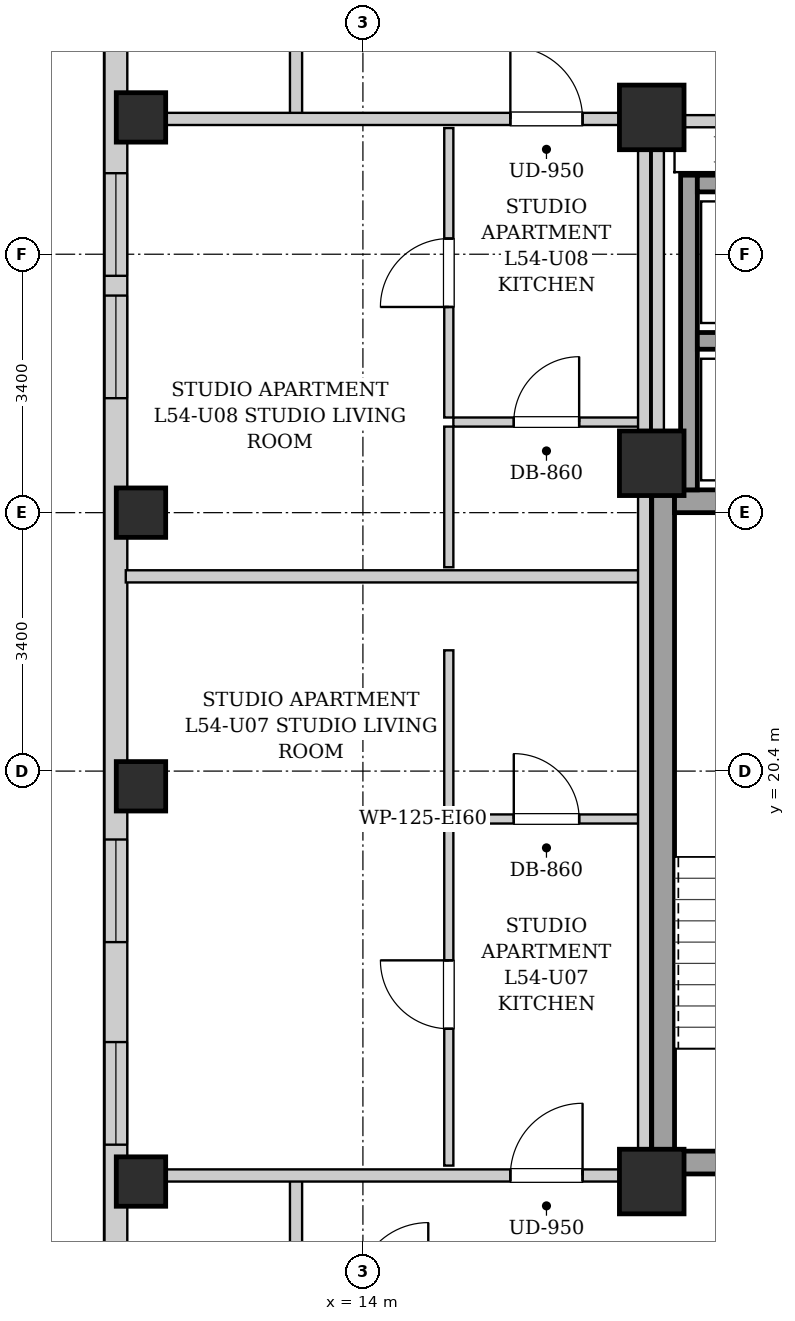
"""IFC4 building model, lengths in metres.
Left out: names, types, materials, properties, quantities, classifications, styles, units other than length and angle.
Written with IfcOpenShell. Run it as: python <this file> out.ifc"""

import sys

from ifc_helpers import new_model, si_unit, direction, frame, frame_2d, origin, origin_2d, place, context, subcontext, project, spatial, rectangle, extrude, element, fill, save


model = new_model("IFC4")
c1 = context("Model", 3, precision=1e-05, world=origin(), true_north=direction((0.0, 1.0)))
c2 = subcontext(c1, "Body", "Model", "MODEL_VIEW")
j1 = project(units=[si_unit("LENGTHUNIT", "METRE"), si_unit("PLANEANGLEUNIT", "RADIAN")], contexts=[c1])
p1 = place(None, origin())
s1 = spatial("IfcSite", under=j1, at=p1, CompositionType="ELEMENT")
p2 = place(p1, origin())
s2 = spatial("IfcBuilding", under=s1, at=p2, CompositionType="ELEMENT")
p3 = place(p2, frame((0.0, 0.0, 187.6)))
s3 = spatial("IfcBuildingStorey", under=s2, at=p3, CompositionType="ELEMENT", Elevation=187.6)
for number, where, z_axis, x_axis in (
    (1, (11.08, 15.0, 0.0), (0.0, 0.0, 1.0), (1.0, 0.0, 0.0)),
    (2, (11.08, 20.2, 0.0), (0.0, 0.0, 1.0), (1.0, 0.0, 0.0)),
    (3, (11.08, 23.8, 0.0), (0.0, 0.0, 1.0), (1.0, 0.0, 0.0)),
    (4, (11.08, 29.0, 0.0), (0.0, 0.0, 1.0), (1.0, 0.0, 0.0)),
):
    element("IfcColumn", number, at=place(p3, frame(where, z_axis=z_axis, x_axis=x_axis)), inside=s3, PredefinedType="COLUMN", context=c2, shape_type="SweptSolid", body=[
        extrude(rectangle(XDim=0.65, YDim=0.65, at=origin_2d()), origin(), (0.0, 0.0, 1.0), 3.3),
    ])
for number, where, z_axis, x_axis in (
    (5, (17.8, 15.0, 0.0), (0.0, 0.0, 1.0), (1.0, 0.0, 0.0)),
    (6, (17.8, 29.0, 0.0), (0.0, 0.0, 1.0), (1.0, 0.0, 0.0)),
    (7, (17.8, 24.45, 0.0), (0.0, 0.0, 1.0), (1.0, 0.0, 0.0)),
):
    element("IfcColumn", number, at=place(p3, frame(where, z_axis=z_axis, x_axis=x_axis)), inside=s3, PredefinedType="COLUMN", context=c2, shape_type="SweptSolid", body=[
        extrude(rectangle(XDim=0.85, YDim=0.85, at=origin_2d()), origin(), (0.0, 0.0, 1.0), 3.3),
    ])
p4 = place(p3, frame((10.75, 6.3, 0.0), z_axis=(0.0, 0.0, 1.0), x_axis=(0.0, 1.0, 0.0)))
e8 = element("IfcWall", 8, at=p4, inside=s3, PredefinedType="SOLIDWALL", context=c2, shape_type="SweptSolid", body=[
    extrude(rectangle(XDim=31.4, YDim=0.3, at=frame_2d((15.7, 0.0))), origin(), (0.0, 0.0, 1.0), 3.04),
])
p5 = place(p4, frame((1.504, 0.0, 0.55)))
e9 = element("IfcOpeningElement", 9, at=p5, cuts=e8, PredefinedType="OPENING", context=c2, shape_type="SweptSolid", body=[
    extrude(rectangle(XDim=1.35, YDim=1.2, at=frame_2d((0.675, 0.6))), frame((0.0, 0.16, 0.0), z_axis=(0.0, -1.0, 0.0), x_axis=(1.0, 0.0, 0.0)), (0.0, 0.0, 1.0), 0.32),
])
p6 = place(p4, frame((28.546, 0.0, 0.55)))
e10 = element("IfcOpeningElement", 10, at=p6, cuts=e8, PredefinedType="OPENING", context=c2, shape_type="SweptSolid", body=[
    extrude(rectangle(XDim=1.35, YDim=1.2, at=frame_2d((0.675, 0.6))), frame((0.0, 0.16, 0.0), z_axis=(0.0, -1.0, 0.0), x_axis=(1.0, 0.0, 0.0)), (0.0, 0.0, 1.0), 0.32),
])
p7 = place(p4, frame((11.85, 0.0, 0.55)))
e11 = element("IfcOpeningElement", 11, at=p7, cuts=e8, PredefinedType="OPENING", context=c2, shape_type="SweptSolid", body=[
    extrude(rectangle(XDim=1.35, YDim=1.2, at=frame_2d((0.675, 0.6))), frame((0.0, 0.16, 0.0), z_axis=(0.0, -1.0, 0.0), x_axis=(1.0, 0.0, 0.0)), (0.0, 0.0, 1.0), 0.32),
])
p8 = place(p4, frame((9.185, 0.0, 0.55)))
e12 = element("IfcOpeningElement", 12, at=p8, cuts=e8, PredefinedType="OPENING", context=c2, shape_type="SweptSolid", body=[
    extrude(rectangle(XDim=1.35, YDim=1.2, at=frame_2d((0.675, 0.6))), frame((0.0, 0.16, 0.0), z_axis=(0.0, -1.0, 0.0), x_axis=(1.0, 0.0, 0.0)), (0.0, 0.0, 1.0), 0.32),
])
p9 = place(p4, frame((19.006, 0.0, 0.55)))
e13 = element("IfcOpeningElement", 13, at=p9, cuts=e8, PredefinedType="OPENING", context=c2, shape_type="SweptSolid", body=[
    extrude(rectangle(XDim=1.35, YDim=1.2, at=frame_2d((0.675, 0.6))), frame((0.0, 0.16, 0.0), z_axis=(0.0, -1.0, 0.0), x_axis=(1.0, 0.0, 0.0)), (0.0, 0.0, 1.0), 0.32),
])
p10 = place(p4, frame((20.616, 0.0, 0.55)))
e14 = element("IfcOpeningElement", 14, at=p10, cuts=e8, PredefinedType="OPENING", context=c2, shape_type="SweptSolid", body=[
    extrude(rectangle(XDim=1.35, YDim=1.2, at=frame_2d((0.675, 0.6))), frame((0.0, 0.16, 0.0), z_axis=(0.0, -1.0, 0.0), x_axis=(1.0, 0.0, 0.0)), (0.0, 0.0, 1.0), 0.32),
])
p11 = place(p3, frame((17.95, 15.1, 0.0), z_axis=(0.0, 0.0, 1.0), x_axis=(0.0, 1.0, 0.0)))
e15 = element("IfcWall", 15, at=p11, inside=s3, PredefinedType="SHEAR", context=c2, shape_type="SweptSolid", body=[
    extrude(rectangle(XDim=9.0, YDim=0.3, at=frame_2d((4.5, 0.0))), origin(), (0.0, 0.0, 1.0), 3.04),
])
p12 = place(p3, frame((18.1, 23.95, 0.0), z_axis=(0.0, 0.0, 1.0), x_axis=(1.0, 0.0, 0.0)))
e16 = element("IfcWall", 16, at=p12, inside=s3, PredefinedType="SHEAR", context=c2, shape_type="SweptSolid", body=[
    extrude(rectangle(XDim=2.85, YDim=0.3, at=frame_2d((1.425, 0.0))), origin(), (0.0, 0.0, 1.0), 3.04),
])
p13 = place(p3, frame((18.1, 15.25, 0.0), z_axis=(0.0, 0.0, 1.0), x_axis=(1.0, 0.0, 0.0)))
e17 = element("IfcWall", 17, at=p13, inside=s3, PredefinedType="SHEAR", context=c2, shape_type="SweptSolid", body=[
    extrude(rectangle(XDim=2.85, YDim=0.3, at=frame_2d((1.425, 0.0))), origin(), (0.0, 0.0, 1.0), 3.04),
])
p14 = place(p13, frame((0.86, 0.0, 0.0)))
e18 = element("IfcOpeningElement", 18, at=p14, cuts=e17, PredefinedType="OPENING", context=c2, shape_type="SweptSolid", body=[
    extrude(rectangle(XDim=1.1, YDim=2.05, at=frame_2d((0.55, 1.025))), frame((0.0, 0.16, 0.0), z_axis=(0.0, -1.0, 0.0), x_axis=(1.0, 0.0, 0.0)), (0.0, 0.0, 1.0), 0.32),
])
p15 = place(p3, frame((18.29, 24.1, 0.0), z_axis=(0.0, 0.0, 1.0), x_axis=(0.0, 1.0, 0.0)))
e19 = element("IfcWall", 19, at=p15, inside=s3, PredefinedType="SHEAR", context=c2, shape_type="SweptSolid", body=[
    extrude(rectangle(XDim=4.14, YDim=0.22, at=frame_2d((2.07, 0.0))), origin(), (0.0, 0.0, 1.0), 3.04),
])
for number, where, z_axis, x_axis in (
    (20, (18.4, 26.06, 0.0), (0.0, 0.0, 1.0), (1.0, 0.0, 0.0)),
    (21, (18.4, 28.13, 0.0), (0.0, 0.0, 1.0), (1.0, 0.0, 0.0)),
):
    element("IfcWall", number, at=place(p3, frame(where, z_axis=z_axis, x_axis=x_axis)), inside=s3, PredefinedType="SHEAR", context=c2, shape_type="SweptSolid", body=[
        extrude(rectangle(XDim=1.9, YDim=0.22, at=frame_2d((0.95, 0.0))), origin(), (0.0, 0.0, 1.0), 3.04),
    ])
p16 = place(p3, frame((17.88, 24.12, 0.0), z_axis=(0.0, 0.0, 1.0), x_axis=(0.0, 1.0, 0.0)))
e22 = element("IfcWall", 22, at=p16, inside=s3, PredefinedType="PARTITIONING", context=c2, shape_type="SweptSolid", body=[
    extrude(rectangle(XDim=4.76, YDim=0.16, at=frame_2d((2.38, 0.0))), origin(), (0.0, 0.0, 1.0), 2.375),
])
p17 = place(p3, frame((17.96, 28.95, 0.0), z_axis=(0.0, 0.0, 1.0), x_axis=(1.0, 0.0, 0.0)))
e23 = element("IfcWall", 23, at=p17, inside=s3, PredefinedType="PARTITIONING", context=c2, shape_type="SweptSolid", body=[
    extrude(rectangle(XDim=4.29, YDim=0.16, at=frame_2d((2.145, 0.0))), origin(), (0.0, 0.0, 1.0), 2.556),
])
p18 = place(p17, frame((1.715, 0.0, 0.0)))
e24 = element("IfcOpeningElement", 24, at=p18, cuts=e23, PredefinedType="OPENING", context=c2, shape_type="SweptSolid", body=[
    extrude(rectangle(XDim=0.86, YDim=2.05, at=frame_2d((0.43, 1.025))), frame((0.0, 0.09, 0.0), z_axis=(0.0, -1.0, 0.0), x_axis=(1.0, 0.0, 0.0)), (0.0, 0.0, 1.0), 0.18),
])
for number, where, z_axis, x_axis in (
    (25, (13.12, 13.51, 0.0), (0.0, 0.0, 1.0), (0.0, 1.0, 0.0)),
    (26, (13.12, 28.98, 0.0), (0.0, 0.0, 1.0), (0.0, 1.0, 0.0)),
):
    element("IfcWall", number, at=place(p3, frame(where, z_axis=z_axis, x_axis=x_axis)), inside=s3, PredefinedType="PARTITIONING", context=c2, shape_type="SweptSolid", body=[
        extrude(rectangle(XDim=1.58, YDim=0.16, at=frame_2d((0.79, 0.0))), origin(), (0.0, 0.0, 1.0), 3.04),
    ])
p19 = place(p3, frame((10.88, 15.08, 0.0), z_axis=(0.0, 0.0, 1.0), x_axis=(1.0, 0.0, 0.0)))
e27 = element("IfcWall", 27, at=p19, inside=s3, PredefinedType="PARTITIONING", context=c2, shape_type="SweptSolid", body=[
    extrude(rectangle(XDim=6.88, YDim=0.16, at=frame_2d((3.44, 0.0))), origin(), (0.0, 0.0, 1.0), 2.556),
])
p20 = place(p19, frame((5.06, 0.0, 0.0)))
e28 = element("IfcOpeningElement", 28, at=p20, cuts=e27, PredefinedType="OPENING", context=c2, shape_type="SweptSolid", body=[
    extrude(rectangle(XDim=0.95, YDim=2.1, at=frame_2d((0.475, 1.05))), frame((0.0, 0.09, 0.0), z_axis=(0.0, -1.0, 0.0), x_axis=(1.0, 0.0, 0.0)), (0.0, 0.0, 1.0), 0.18),
])
p21 = place(p3, frame((10.88, 22.962, 0.0), z_axis=(0.0, 0.0, 1.0), x_axis=(1.0, 0.0, 0.0)))
e29 = element("IfcWall", 29, at=p21, inside=s3, PredefinedType="PARTITIONING", context=c2, shape_type="SweptSolid", body=[
    extrude(rectangle(XDim=6.76, YDim=0.16, at=frame_2d((3.38, 0.0))), origin(), (0.0, 0.0, 1.0), 3.04),
])
p22 = place(p3, frame((15.19, 19.77, 0.0), z_axis=(0.0, 0.0, 1.0), x_axis=(1.0, 0.0, 0.0)))
e30 = element("IfcWall", 30, at=p22, inside=s3, PredefinedType="PARTITIONING", context=c2, shape_type="SweptSolid", body=[
    extrude(rectangle(XDim=2.45, YDim=0.12, at=frame_2d((1.225, 0.0))), origin(), (0.0, 0.0, 1.0), 3.04),
])
p23 = place(p22, frame((0.795, 0.0, 0.0)))
e31 = element("IfcOpeningElement", 31, at=p23, cuts=e30, PredefinedType="OPENING", context=c2, shape_type="SweptSolid", body=[
    extrude(rectangle(XDim=0.86, YDim=2.05, at=frame_2d((0.43, 1.025))), frame((0.0, 0.07, 0.0), z_axis=(0.0, -1.0, 0.0), x_axis=(1.0, 0.0, 0.0)), (0.0, 0.0, 1.0), 0.14),
])
p24 = place(p3, frame((15.13, 19.83, 0.0), z_axis=(0.0, 0.0, 1.0), x_axis=(0.0, 1.0, 0.0)))
e32 = element("IfcWall", 32, at=p24, inside=s3, PredefinedType="PARTITIONING", context=c2, shape_type="SweptSolid", body=[
    extrude(rectangle(XDim=2.159, YDim=0.12, at=frame_2d((1.08, 0.0))), origin(), (0.0, 0.0, 1.0), 3.04),
])
p25 = place(p3, frame((15.13, 15.21, 0.0), z_axis=(0.0, 0.0, 1.0), x_axis=(0.0, 1.0, 0.0)))
e33 = element("IfcWall", 33, at=p25, inside=s3, PredefinedType="PARTITIONING", context=c2, shape_type="SweptSolid", body=[
    extrude(rectangle(XDim=4.5, YDim=0.12, at=frame_2d((2.25, 0.0))), origin(), (0.0, 0.0, 1.0), 3.04),
])
p26 = place(p25, frame((1.8, 0.0, 0.0)))
e34 = element("IfcOpeningElement", 34, at=p26, cuts=e33, PredefinedType="OPENING", context=c2, shape_type="SweptSolid", body=[
    extrude(rectangle(XDim=0.9, YDim=2.05, at=frame_2d((0.45, 1.025))), frame((0.0, 0.07, 0.0), z_axis=(0.0, -1.0, 0.0), x_axis=(1.0, 0.0, 0.0)), (0.0, 0.0, 1.0), 0.14),
])
p27 = place(p3, frame((10.88, 28.98, 0.0), z_axis=(0.0, 0.0, 1.0), x_axis=(1.0, 0.0, 0.0)))
e35 = element("IfcWall", 35, at=p27, inside=s3, PredefinedType="PARTITIONING", context=c2, shape_type="SweptSolid", body=[
    extrude(rectangle(XDim=6.88, YDim=0.16, at=frame_2d((3.44, 0.0))), origin(), (0.0, 0.0, 1.0), 2.556),
])
p28 = place(p27, frame((5.06, 0.0, 0.0)))
e36 = element("IfcOpeningElement", 36, at=p28, cuts=e35, PredefinedType="OPENING", context=c2, shape_type="SweptSolid", body=[
    extrude(rectangle(XDim=0.95, YDim=2.1, at=frame_2d((0.475, 1.05))), frame((0.0, 0.09, 0.0), z_axis=(0.0, -1.0, 0.0), x_axis=(1.0, 0.0, 0.0)), (0.0, 0.0, 1.0), 0.18),
])
p29 = place(p3, frame((15.19, 24.992, 0.0), z_axis=(0.0, 0.0, 1.0), x_axis=(1.0, 0.0, 0.0)))
e37 = element("IfcWall", 37, at=p29, inside=s3, PredefinedType="PARTITIONING", context=c2, shape_type="SweptSolid", body=[
    extrude(rectangle(XDim=2.45, YDim=0.12, at=frame_2d((1.225, 0.0))), origin(), (0.0, 0.0, 1.0), 3.04),
])
p30 = place(p29, frame((0.795, 0.0, 0.0)))
e38 = element("IfcOpeningElement", 38, at=p30, cuts=e37, PredefinedType="OPENING", context=c2, shape_type="SweptSolid", body=[
    extrude(rectangle(XDim=0.86, YDim=2.05, at=frame_2d((0.43, 1.025))), frame((0.0, 0.07, 0.0), z_axis=(0.0, -1.0, 0.0), x_axis=(1.0, 0.0, 0.0)), (0.0, 0.0, 1.0), 0.14),
])
p31 = place(p3, frame((15.13, 23.082, 0.0), z_axis=(0.0, 0.0, 1.0), x_axis=(0.0, 1.0, 0.0)))
e39 = element("IfcWall", 39, at=p31, inside=s3, PredefinedType="PARTITIONING", context=c2, shape_type="SweptSolid", body=[
    extrude(rectangle(XDim=1.85, YDim=0.12, at=frame_2d((0.925, 0.0))), origin(), (0.0, 0.0, 1.0), 3.04),
])
p32 = place(p3, frame((15.13, 25.052, 0.0), z_axis=(0.0, 0.0, 1.0), x_axis=(0.0, 1.0, 0.0)))
e40 = element("IfcWall", 40, at=p32, inside=s3, PredefinedType="PARTITIONING", context=c2, shape_type="SweptSolid", body=[
    extrude(rectangle(XDim=3.808, YDim=0.12, at=frame_2d((1.904, 0.0))), origin(), (0.0, 0.0, 1.0), 3.04),
])
p33 = place(p32, frame((1.454, 0.0, 0.0)))
e41 = element("IfcOpeningElement", 41, at=p33, cuts=e40, PredefinedType="OPENING", context=c2, shape_type="SweptSolid", body=[
    extrude(rectangle(XDim=0.9, YDim=2.05, at=frame_2d((0.45, 1.025))), frame((0.0, 0.07, 0.0), z_axis=(0.0, -1.0, 0.0), x_axis=(1.0, 0.0, 0.0)), (0.0, 0.0, 1.0), 0.14),
])
p34 = place(p3, frame((17.7, 15.02, 0.0), z_axis=(0.0, 0.0, 1.0), x_axis=(0.0, 1.0, 0.0)))
e42 = element("IfcWall", 42, at=p34, inside=s3, PredefinedType="PARTITIONING", context=c2, shape_type="SweptSolid", body=[
    extrude(rectangle(XDim=13.98, YDim=0.16, at=frame_2d((6.99, 0.0))), origin(), (0.0, 0.0, 1.0), 2.375),
])
p35 = place(p20, origin())
e43 = element("IfcDoor", 43, at=p35, inside=s3, OperationType="SINGLE_SWING_RIGHT", PredefinedType="DOOR", context=c2, shape_type="SweptSolid", body=[
    extrude(rectangle(XDim=0.95, YDim=2.1, at=frame_2d((0.475, 1.05))), frame((0.0, 0.025, 0.0), z_axis=(0.0, -1.0, 0.0), x_axis=(1.0, 0.0, 0.0)), (0.0, 0.0, 1.0), 0.05),
])
fill(e28, e43)
p36 = place(p23, origin())
e44 = element("IfcDoor", 44, at=p36, inside=s3, OperationType="SINGLE_SWING_LEFT", PredefinedType="DOOR", context=c2, shape_type="SweptSolid", body=[
    extrude(rectangle(XDim=0.86, YDim=2.05, at=frame_2d((0.43, 1.025))), frame((0.0, 0.025, 0.0), z_axis=(0.0, -1.0, 0.0), x_axis=(1.0, 0.0, 0.0)), (0.0, 0.0, 1.0), 0.05),
])
fill(e31, e44)
p37 = place(p26, origin())
e45 = element("IfcDoor", 45, at=p37, inside=s3, OperationType="SINGLE_SWING_RIGHT", PredefinedType="DOOR", context=c2, shape_type="SweptSolid", body=[
    extrude(rectangle(XDim=0.9, YDim=2.05, at=frame_2d((0.45, 1.025))), frame((0.0, 0.025, 0.0), z_axis=(0.0, -1.0, 0.0), x_axis=(1.0, 0.0, 0.0)), (0.0, 0.0, 1.0), 0.05),
])
fill(e34, e45)
p38 = place(p28, origin())
e46 = element("IfcDoor", 46, at=p38, inside=s3, OperationType="SINGLE_SWING_LEFT", PredefinedType="DOOR", context=c2, shape_type="SweptSolid", body=[
    extrude(rectangle(XDim=0.95, YDim=2.1, at=frame_2d((0.475, 1.05))), frame((0.0, 0.025, 0.0), z_axis=(0.0, -1.0, 0.0), x_axis=(1.0, 0.0, 0.0)), (0.0, 0.0, 1.0), 0.05),
])
fill(e36, e46)
p39 = place(p30, origin())
e47 = element("IfcDoor", 47, at=p39, inside=s3, OperationType="SINGLE_SWING_RIGHT", PredefinedType="DOOR", context=c2, shape_type="SweptSolid", body=[
    extrude(rectangle(XDim=0.86, YDim=2.05, at=frame_2d((0.43, 1.025))), frame((0.0, 0.025, 0.0), z_axis=(0.0, -1.0, 0.0), x_axis=(1.0, 0.0, 0.0)), (0.0, 0.0, 1.0), 0.05),
])
fill(e38, e47)
p40 = place(p33, origin())
e48 = element("IfcDoor", 48, at=p40, inside=s3, OperationType="SINGLE_SWING_LEFT", PredefinedType="DOOR", context=c2, shape_type="SweptSolid", body=[
    extrude(rectangle(XDim=0.9, YDim=2.05, at=frame_2d((0.45, 1.025))), frame((0.0, 0.025, 0.0), z_axis=(0.0, -1.0, 0.0), x_axis=(1.0, 0.0, 0.0)), (0.0, 0.0, 1.0), 0.05),
])
fill(e41, e48)
p41 = place(p7, origin())
e49 = element("IfcWindow", 49, at=p41, inside=s3, PartitioningType="SINGLE_PANEL", PredefinedType="WINDOW", context=c2, shape_type="SweptSolid", body=[
    extrude(rectangle(XDim=1.35, YDim=1.2, at=frame_2d((0.675, 0.6))), frame((0.0, 0.03, 0.0), z_axis=(0.0, -1.0, 0.0), x_axis=(1.0, 0.0, 0.0)), (0.0, 0.0, 1.0), 0.06),
])
fill(e11, e49)
p42 = place(p8, origin())
e50 = element("IfcWindow", 50, at=p42, inside=s3, PartitioningType="SINGLE_PANEL", PredefinedType="WINDOW", context=c2, shape_type="SweptSolid", body=[
    extrude(rectangle(XDim=1.35, YDim=1.2, at=frame_2d((0.675, 0.6))), frame((0.0, 0.03, 0.0), z_axis=(0.0, -1.0, 0.0), x_axis=(1.0, 0.0, 0.0)), (0.0, 0.0, 1.0), 0.06),
])
fill(e12, e50)
p43 = place(p9, origin())
e51 = element("IfcWindow", 51, at=p43, inside=s3, PartitioningType="SINGLE_PANEL", PredefinedType="WINDOW", context=c2, shape_type="SweptSolid", body=[
    extrude(rectangle(XDim=1.35, YDim=1.2, at=frame_2d((0.675, 0.6))), frame((0.0, 0.03, 0.0), z_axis=(0.0, -1.0, 0.0), x_axis=(1.0, 0.0, 0.0)), (0.0, 0.0, 1.0), 0.06),
])
fill(e13, e51)
p44 = place(p10, origin())
e52 = element("IfcWindow", 52, at=p44, inside=s3, PartitioningType="SINGLE_PANEL", PredefinedType="WINDOW", context=c2, shape_type="SweptSolid", body=[
    extrude(rectangle(XDim=1.35, YDim=1.2, at=frame_2d((0.675, 0.6))), frame((0.0, 0.03, 0.0), z_axis=(0.0, -1.0, 0.0), x_axis=(1.0, 0.0, 0.0)), (0.0, 0.0, 1.0), 0.06),
])
fill(e14, e52)
save(model, sys.argv[1])
